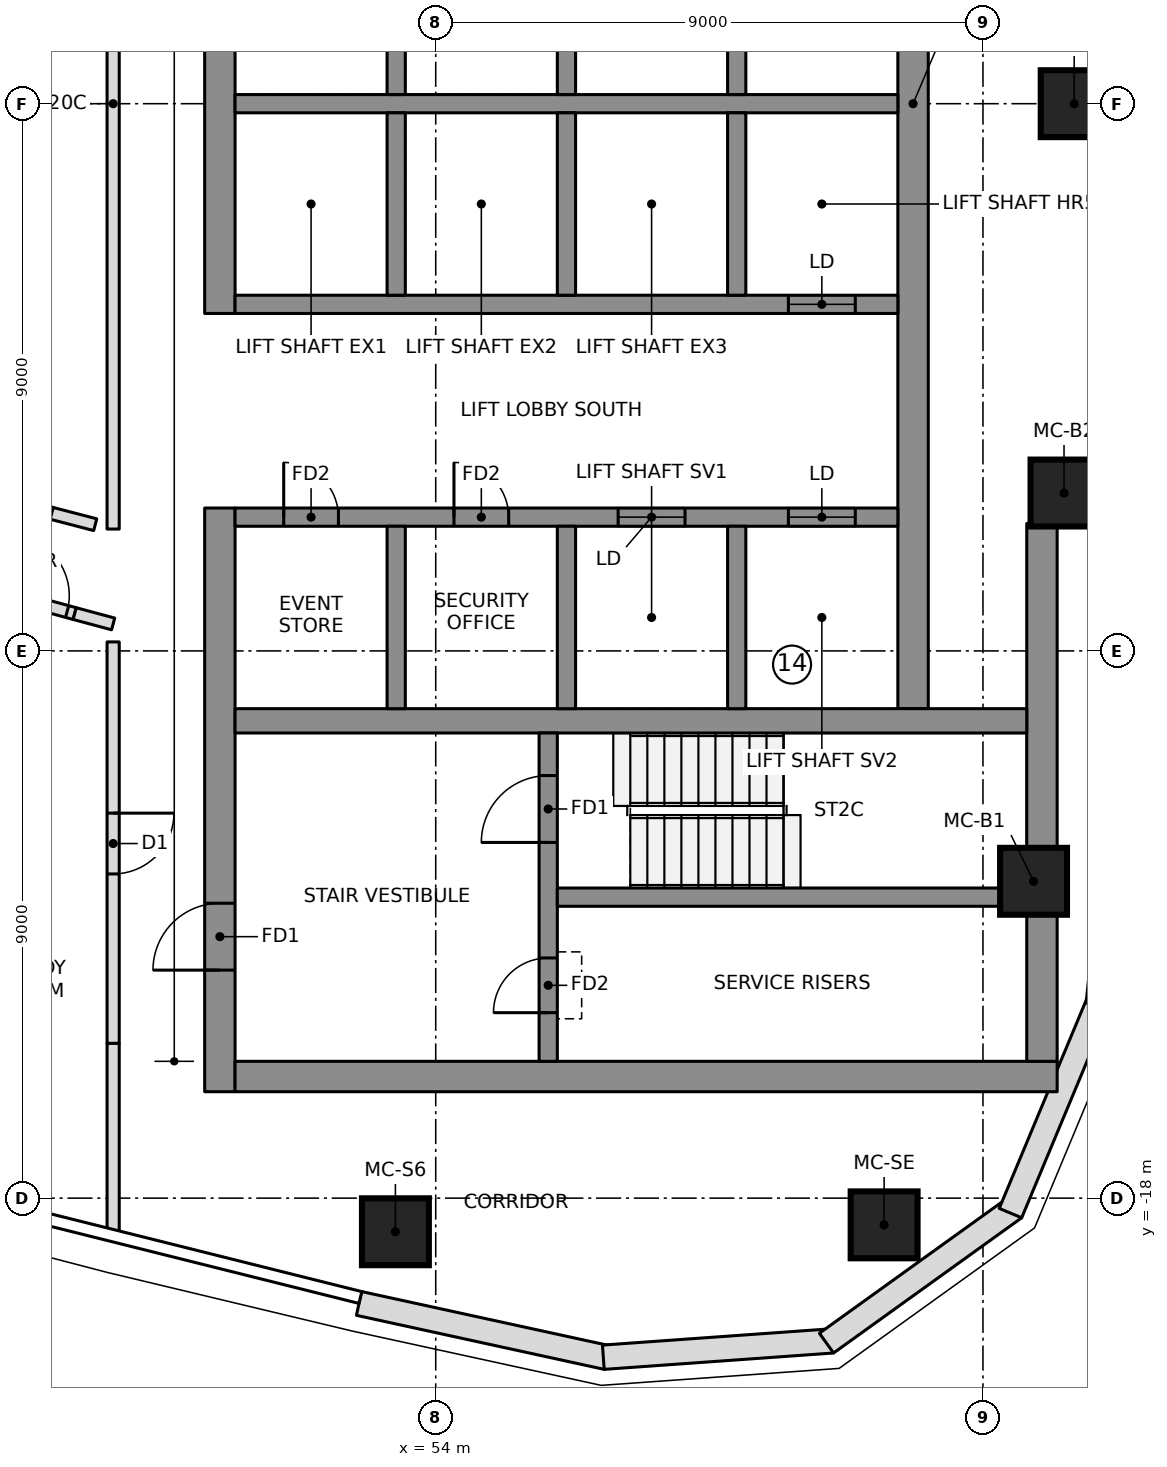
"""IFC4 building model, lengths in metres.
Left out: names, types, materials, properties, quantities, classifications, styles, units other than length and angle.
Written with IfcOpenShell. Run it as: python <this file> out.ifc"""

import sys

from ifc_helpers import new_model, si_unit, direction, frame, frame_2d, origin, origin_2d, place, context, subcontext, project, spatial, polyline, rectangle, outline, extrude, element, fill, save


model = new_model("IFC4")
c1 = context("Model", 3, precision=1e-05, world=origin(), true_north=direction((0.0, 1.0)))
c2 = subcontext(c1, "Body", "Model", "MODEL_VIEW")
j1 = project(units=[si_unit("LENGTHUNIT", "METRE"), si_unit("PLANEANGLEUNIT", "RADIAN")], contexts=[c1])
p1 = place(None, origin())
s1 = spatial("IfcSite", under=j1, at=p1, CompositionType="ELEMENT")
p2 = place(p1, origin())
s2 = spatial("IfcBuilding", under=s1, at=p2, CompositionType="ELEMENT")
p3 = place(p2, frame((0.0, 0.0, 267.9)))
s3 = spatial("IfcBuildingStorey", under=s2, at=p3, CompositionType="ELEMENT", Elevation=267.9)
p4 = place(p3, frame((50.45, -3.45, 0.0), z_axis=(0.0, 0.0, 1.0), x_axis=(0.0, 1.0, 0.0)))
e1 = element("IfcWall", 1, at=p4, inside=s3, PredefinedType="SHEAR", context=c2, shape_type="SweptSolid", body=[
    extrude(rectangle(XDim=6.9, YDim=0.5, at=frame_2d((3.45, 0.0))), origin(), (0.0, 0.0, 1.0), 3.55),
])
p5 = place(p3, frame((50.45, -16.25, 0.0), z_axis=(0.0, 0.0, 1.0), x_axis=(0.0, 1.0, 0.0)))
e2 = element("IfcWall", 2, at=p5, inside=s3, PredefinedType="SHEAR", context=c2, shape_type="SweptSolid", body=[
    extrude(rectangle(XDim=9.6, YDim=0.5, at=frame_2d((4.8, 0.0))), origin(), (0.0, 0.0, 1.0), 3.55),
])
p6 = place(p5, frame((2.0, 0.0, 0.0)))
e3 = element("IfcOpeningElement", 3, at=p6, cuts=e2, PredefinedType="OPENING", context=c2, shape_type="SweptSolid", body=[
    extrude(rectangle(XDim=1.1, YDim=2.1, at=frame_2d((0.55, 1.05))), frame((0.0, 0.26, 0.0), z_axis=(0.0, -1.0, 0.0), x_axis=(1.0, 0.0, 0.0)), (0.0, 0.0, 1.0), 0.52),
])
p7 = place(p3, frame((50.7, -16.0, 0.0), z_axis=(0.0, 0.0, 1.0), x_axis=(1.0, 0.0, 0.0)))
e4 = element("IfcWall", 4, at=p7, inside=s3, PredefinedType="SHEAR", context=c2, shape_type="SweptSolid", body=[
    extrude(rectangle(XDim=13.52, YDim=0.5, at=frame_2d((6.76, 0.0))), origin(), (0.0, 0.0, 1.0), 3.55),
])
p8 = place(p3, frame((63.97, -15.75, 0.0), z_axis=(0.0, 0.0, 1.0), x_axis=(0.0, 1.0, 0.0)))
e5 = element("IfcWall", 5, at=p8, inside=s3, PredefinedType="SHEAR", context=c2, shape_type="SweptSolid", body=[
    extrude(rectangle(XDim=8.847, YDim=0.5, at=frame_2d((4.423, 0.0))), origin(), (0.0, 0.0, 1.0), 3.55),
])
p9 = place(p3, frame((61.85, -9.95, 0.0), z_axis=(0.0, 0.0, 1.0), x_axis=(0.0, 1.0, 0.0)))
e6 = element("IfcWall", 6, at=p9, inside=s3, PredefinedType="SHEAR", context=c2, shape_type="SweptSolid", body=[
    extrude(rectangle(XDim=19.9, YDim=0.5, at=frame_2d((9.95, 0.0))), origin(), (0.0, 0.0, 1.0), 3.55),
])
p10 = place(p3, frame((50.7, -10.15, 0.0), z_axis=(0.0, 0.0, 1.0), x_axis=(1.0, 0.0, 0.0)))
e7 = element("IfcWall", 7, at=p10, inside=s3, PredefinedType="SHEAR", context=c2, shape_type="SweptSolid", body=[
    extrude(rectangle(XDim=13.02, YDim=0.4, at=frame_2d((6.51, 0.0))), origin(), (0.0, 0.0, 1.0), 3.55),
])
p11 = place(p3, frame((50.7, 0.0, 0.0), z_axis=(0.0, 0.0, 1.0), x_axis=(1.0, 0.0, 0.0)))
e8 = element("IfcWall", 8, at=p11, inside=s3, PredefinedType="SHEAR", context=c2, shape_type="SweptSolid", body=[
    extrude(rectangle(XDim=10.9, YDim=0.3, at=frame_2d((5.45, 0.0))), origin(), (0.0, 0.0, 1.0), 3.55),
])
for number, where, z_axis, x_axis in (
    (9, (53.35, 0.15, 0.0), (0.0, 0.0, 1.0), (0.0, 1.0, 0.0)),
    (10, (56.15, 0.15, 0.0), (0.0, 0.0, 1.0), (0.0, 1.0, 0.0)),
    (11, (58.95, 0.15, 0.0), (0.0, 0.0, 1.0), (0.0, 1.0, 0.0)),
):
    element("IfcWall", number, at=place(p3, frame(where, z_axis=z_axis, x_axis=x_axis)), inside=s3, PredefinedType="SHEAR", context=c2, shape_type="SweptSolid", body=[
        extrude(rectangle(XDim=3.0, YDim=0.3, at=frame_2d((1.5, 0.0))), origin(), (0.0, 0.0, 1.0), 3.55),
    ])
p12 = place(p3, frame((50.7, -3.3, 0.0), z_axis=(0.0, 0.0, 1.0), x_axis=(1.0, 0.0, 0.0)))
e12 = element("IfcWall", 12, at=p12, inside=s3, PredefinedType="SHEAR", context=c2, shape_type="SweptSolid", body=[
    extrude(rectangle(XDim=10.9, YDim=0.3, at=frame_2d((5.45, 0.0))), origin(), (0.0, 0.0, 1.0), 3.55),
])
p13 = place(p12, frame((9.1, 0.0, 0.0)))
e13 = element("IfcOpeningElement", 13, at=p13, cuts=e12, PredefinedType="OPENING", context=c2, shape_type="SweptSolid", body=[
    extrude(rectangle(XDim=1.1, YDim=2.1, at=frame_2d((0.55, 1.05))), frame((0.0, 0.16, 0.0), z_axis=(0.0, -1.0, 0.0), x_axis=(1.0, 0.0, 0.0)), (0.0, 0.0, 1.0), 0.32),
])
p14 = place(p3, frame((50.7, -6.8, 0.0), z_axis=(0.0, 0.0, 1.0), x_axis=(1.0, 0.0, 0.0)))
e14 = element("IfcWall", 14, at=p14, inside=s3, PredefinedType="SHEAR", context=c2, shape_type="SweptSolid", body=[
    extrude(rectangle(XDim=10.9, YDim=0.3, at=frame_2d((5.45, 0.0))), origin(), (0.0, 0.0, 1.0), 3.55),
])
p15 = place(p14, frame((6.3, 0.0, 0.0)))
e15 = element("IfcOpeningElement", 15, at=p15, cuts=e14, PredefinedType="OPENING", context=c2, shape_type="SweptSolid", body=[
    extrude(rectangle(XDim=1.1, YDim=2.1, at=frame_2d((0.55, 1.05))), frame((0.0, 0.16, 0.0), z_axis=(0.0, -1.0, 0.0), x_axis=(1.0, 0.0, 0.0)), (0.0, 0.0, 1.0), 0.32),
])
p16 = place(p14, frame((9.1, 0.0, 0.0)))
e16 = element("IfcOpeningElement", 16, at=p16, cuts=e14, PredefinedType="OPENING", context=c2, shape_type="SweptSolid", body=[
    extrude(rectangle(XDim=1.1, YDim=2.1, at=frame_2d((0.55, 1.05))), frame((0.0, 0.16, 0.0), z_axis=(0.0, -1.0, 0.0), x_axis=(1.0, 0.0, 0.0)), (0.0, 0.0, 1.0), 0.32),
])
p17 = place(p14, frame((0.8, 0.0, 0.0)))
e17 = element("IfcOpeningElement", 17, at=p17, cuts=e14, PredefinedType="OPENING", context=c2, shape_type="SweptSolid", body=[
    extrude(rectangle(XDim=0.9, YDim=2.1, at=frame_2d((0.45, 1.05))), frame((0.0, 0.16, 0.0), z_axis=(0.0, -1.0, 0.0), x_axis=(1.0, 0.0, 0.0)), (0.0, 0.0, 1.0), 0.32),
])
p18 = place(p14, frame((3.6, 0.0, 0.0)))
e18 = element("IfcOpeningElement", 18, at=p18, cuts=e14, PredefinedType="OPENING", context=c2, shape_type="SweptSolid", body=[
    extrude(rectangle(XDim=0.9, YDim=2.1, at=frame_2d((0.45, 1.05))), frame((0.0, 0.16, 0.0), z_axis=(0.0, -1.0, 0.0), x_axis=(1.0, 0.0, 0.0)), (0.0, 0.0, 1.0), 0.32),
])
for number, where, z_axis, x_axis in (
    (19, (53.35, -3.15, 0.0), (0.0, 0.0, 1.0), (0.0, 1.0, 0.0)),
    (20, (53.35, -9.95, 0.0), (0.0, 0.0, 1.0), (0.0, 1.0, 0.0)),
    (21, (56.15, -3.15, 0.0), (0.0, 0.0, 1.0), (0.0, 1.0, 0.0)),
    (22, (56.15, -9.95, 0.0), (0.0, 0.0, 1.0), (0.0, 1.0, 0.0)),
    (23, (58.95, -3.15, 0.0), (0.0, 0.0, 1.0), (0.0, 1.0, 0.0)),
    (24, (58.95, -9.95, 0.0), (0.0, 0.0, 1.0), (0.0, 1.0, 0.0)),
):
    element("IfcWall", number, at=place(p3, frame(where, z_axis=z_axis, x_axis=x_axis)), inside=s3, PredefinedType="SHEAR", context=c2, shape_type="SweptSolid", body=[
        extrude(rectangle(XDim=3.0, YDim=0.3, at=frame_2d((1.5, 0.0))), origin(), (0.0, 0.0, 1.0), 3.55),
    ])
p19 = place(p3, frame((55.85, -15.75, 0.0), z_axis=(0.0, 0.0, 1.0), x_axis=(0.0, 1.0, 0.0)))
e25 = element("IfcWall", 25, at=p19, inside=s3, PredefinedType="SHEAR", context=c2, shape_type="SweptSolid", body=[
    extrude(rectangle(XDim=5.4, YDim=0.3, at=frame_2d((2.7, 0.0))), origin(), (0.0, 0.0, 1.0), 3.55),
])
p20 = place(p19, frame((3.6, 0.0, 0.0)))
e26 = element("IfcOpeningElement", 26, at=p20, cuts=e25, PredefinedType="OPENING", context=c2, shape_type="SweptSolid", body=[
    extrude(rectangle(XDim=1.1, YDim=2.1, at=frame_2d((0.55, 1.05))), frame((0.0, 0.16, 0.0), z_axis=(0.0, -1.0, 0.0), x_axis=(1.0, 0.0, 0.0)), (0.0, 0.0, 1.0), 0.32),
])
p21 = place(p19, frame((0.8, 0.0, 0.0)))
e27 = element("IfcOpeningElement", 27, at=p21, cuts=e25, PredefinedType="OPENING", context=c2, shape_type="SweptSolid", body=[
    extrude(rectangle(XDim=0.9, YDim=2.1, at=frame_2d((0.45, 1.05))), frame((0.0, 0.16, 0.0), z_axis=(0.0, -1.0, 0.0), x_axis=(1.0, 0.0, 0.0)), (0.0, 0.0, 1.0), 0.32),
])
p22 = place(p3, frame((56.0, -13.05, 0.0), z_axis=(0.0, 0.0, 1.0), x_axis=(1.0, 0.0, 0.0)))
e28 = element("IfcWall", 28, at=p22, inside=s3, PredefinedType="SHEAR", context=c2, shape_type="SweptSolid", body=[
    extrude(rectangle(XDim=7.72, YDim=0.3, at=frame_2d((3.86, 0.0))), origin(), (0.0, 0.0, 1.0), 3.55),
])
for number, where, z_axis, x_axis in (
    (29, (53.337, -18.553, 0.0), (0.0, 0.0, 1.0), (1.0, 0.0, 0.0)),
    (30, (61.374, -18.44, 0.0), (0.0, 0.0, 1.0), (1.0, 0.0, 0.0)),
    (31, (63.832, -12.789, 0.0), (0.0, 0.0, 1.0), (1.0, 0.0, 0.0)),
    (32, (64.333, -6.403, 0.0), (0.0, 0.0, 1.0), (1.0, 0.0, 0.0)),
    (33, (64.5, 0.0, 0.0), (0.0, 0.0, 1.0), (1.0, 0.0, 0.0)),
):
    element("IfcColumn", number, at=place(p3, frame(where, z_axis=z_axis, x_axis=x_axis)), inside=s3, PredefinedType="COLUMN", context=c2, shape_type="SweptSolid", body=[
        extrude(rectangle(XDim=1.1, YDim=1.1, at=origin_2d()), origin(), (0.0, 0.0, 1.0), 3.55),
    ])
p23 = place(p3, frame((52.738, -19.732, 0.0), z_axis=(0.0, 0.0, 1.0), x_axis=(0.977020225348, -0.213146614471, 0.0)))
e34 = element("IfcWall", 34, at=p23, inside=s3, PredefinedType="NOTDEFINED", context=c2, shape_type="SweptSolid", body=[
    extrude(outline(polyline([(0.0, -0.2), (4.171, -0.2), (4.113, 0.2), (0.0, 0.2), (0.0, -0.2)])), origin(), (0.0, 0.0, 1.0), 3.25),
])
p24 = place(p3, frame((56.785, -20.615, 0.0), z_axis=(0.0, 0.0, 1.0), x_axis=(0.99746272096, 0.071190731806, 0.0)))
e35 = element("IfcWall", 35, at=p24, inside=s3, PredefinedType="NOTDEFINED", context=c2, shape_type="SweptSolid", body=[
    extrude(outline(polyline([(-0.029, -0.2), (3.753, -0.2), (3.64, 0.2), (0.029, 0.2), (-0.029, -0.2)])), origin(), (0.0, 0.0, 1.0), 3.25),
])
p25 = place(p3, frame((60.472, -20.352, 0.0), z_axis=(0.0, 0.0, 1.0), x_axis=(0.811962548682, 0.583709533533, 0.0)))
e36 = element("IfcWall", 36, at=p25, inside=s3, PredefinedType="NOTDEFINED", context=c2, shape_type="SweptSolid", body=[
    extrude(outline(polyline([(-0.057, -0.2), (3.753, -0.2), (3.64, 0.2), (0.057, 0.2), (-0.057, -0.2)])), origin(), (0.0, 0.0, 1.0), 3.25),
])
p26 = place(p3, frame((63.474, -18.194, 0.0), z_axis=(0.0, 0.0, 1.0), x_axis=(0.385285857918, 0.922797273343, 0.0)))
e37 = element("IfcWall", 37, at=p26, inside=s3, PredefinedType="NOTDEFINED", context=c2, shape_type="SweptSolid", body=[
    extrude(outline(polyline([(-0.057, -0.2), (3.726, -0.2), (3.667, 0.2), (0.057, 0.2), (-0.057, -0.2)])), origin(), (0.0, 0.0, 1.0), 3.25),
])
p27 = place(p3, frame((64.898, -14.782, 0.0), z_axis=(0.0, 0.0, 1.0), x_axis=(0.102249826987, 0.994758751096, 0.0)))
e38 = element("IfcWall", 38, at=p27, inside=s3, PredefinedType="NOTDEFINED", context=c2, shape_type="SweptSolid", body=[
    extrude(outline(polyline([(-0.03, -0.2), (4.237, -0.2), (4.23, 0.2), (0.03, 0.2), (-0.03, -0.2)])), origin(), (0.0, 0.0, 1.0), 3.25),
])
p28 = place(p3, frame((44.031, -7.286, 0.0), z_axis=(0.0, 0.0, 1.0), x_axis=(0.964708521199, -0.263320088726, 0.0)))
e39 = element("IfcWall", 39, at=p28, inside=s3, PredefinedType="PARTITIONING", context=c2, shape_type="SweptSolid", body=[
    extrude(rectangle(XDim=4.179, YDim=0.2, at=frame_2d((2.089, 0.0))), origin(), (0.0, 0.0, 1.0), 3.25),
])
p29 = place(p28, frame((3.05, 0.0, 0.0)))
e40 = element("IfcOpeningElement", 40, at=p29, cuts=e39, PredefinedType="OPENING", context=c2, shape_type="SweptSolid", body=[
    extrude(rectangle(XDim=1.0, YDim=2.1, at=frame_2d((0.5, 1.05))), frame((0.0, 0.11, 0.0), z_axis=(0.0, -1.0, 0.0), x_axis=(1.0, 0.0, 0.0)), (0.0, 0.0, 1.0), 0.22),
])
p30 = place(p3, frame((47.684, -6.738, 0.0), z_axis=(0.0, 0.0, 1.0), x_axis=(-0.962411212211, 0.271596499628, 0.0)))
e41 = element("IfcWall", 41, at=p30, inside=s3, PredefinedType="PARTITIONING", context=c2, shape_type="SweptSolid", body=[
    extrude(rectangle(XDim=3.913, YDim=0.2, at=frame_2d((1.957, 0.0))), origin(), (0.0, 0.0, 1.0), 3.25),
])
p31 = place(p3, frame((48.4, -6.924, 0.0), z_axis=(0.0, 0.0, 1.0), x_axis=(-0.967585713416, 0.252542842294, 0.0)))
e42 = element("IfcWall", 42, at=p31, inside=s3, PredefinedType="PARTITIONING", context=c2, shape_type="SweptSolid", body=[
    extrude(rectangle(XDim=0.74, YDim=0.2, at=frame_2d((0.37, 0.0))), origin(), (0.0, 0.0, 1.0), 3.25),
])
p32 = place(p3, frame((48.695, -8.852, 0.0), z_axis=(0.0, 0.0, 1.0), x_axis=(0.0, -1.0, 0.0)))
e43 = element("IfcWall", 43, at=p32, inside=s3, PredefinedType="PARTITIONING", context=c2, shape_type="SweptSolid", body=[
    extrude(rectangle(XDim=6.603, YDim=0.2, at=frame_2d((3.302, 0.0))), origin(), (0.0, 0.0, 1.0), 3.25),
])
p33 = place(p32, frame((2.816, 0.0, 0.0)))
e44 = element("IfcOpeningElement", 44, at=p33, cuts=e43, PredefinedType="OPENING", context=c2, shape_type="SweptSolid", body=[
    extrude(rectangle(XDim=1.0, YDim=2.1, at=frame_2d((0.5, 1.05))), frame((0.0, 0.11, 0.0), z_axis=(0.0, -1.0, 0.0), x_axis=(1.0, 0.0, 0.0)), (0.0, 0.0, 1.0), 0.22),
])
p34 = place(p3, frame((48.695, 6.996, 0.0), z_axis=(0.0, 0.0, 1.0), x_axis=(0.0, -1.0, 0.0)))
e45 = element("IfcWall", 45, at=p34, inside=s3, PredefinedType="PARTITIONING", context=c2, shape_type="SweptSolid", body=[
    extrude(rectangle(XDim=13.992, YDim=0.2, at=frame_2d((6.996, 0.0))), origin(), (0.0, 0.0, 1.0), 3.25),
])
p35 = place(p3, frame((48.062, -8.386, 0.0), z_axis=(0.0, 0.0, 1.0), x_axis=(0.965669715173, -0.259772980114, 0.0)))
e46 = element("IfcWall", 46, at=p35, inside=s3, PredefinedType="PARTITIONING", context=c2, shape_type="SweptSolid", body=[
    extrude(rectangle(XDim=0.655, YDim=0.2, at=frame_2d((0.328, 0.0))), origin(), (0.0, 0.0, 1.0), 3.25),
])
p36 = place(p3, frame((48.695, -15.455, 0.0), z_axis=(0.0, 0.0, 1.0), x_axis=(0.0, -1.0, 0.0)))
e47 = element("IfcWall", 47, at=p36, inside=s3, PredefinedType="PARTITIONING", context=c2, shape_type="SweptSolid", body=[
    extrude(rectangle(XDim=3.098, YDim=0.2, at=frame_2d((1.549, 0.0))), origin(), (0.0, 0.0, 1.0), 3.25),
])
p37 = place(p29, origin())
e48 = element("IfcDoor", 48, at=p37, inside=s3, OperationType="SINGLE_SWING_RIGHT", PredefinedType="DOOR", context=c2, shape_type="SweptSolid", body=[
    extrude(rectangle(XDim=1.0, YDim=2.1, at=frame_2d((0.5, 1.05))), frame((0.0, 0.025, 0.0), z_axis=(0.0, -1.0, 0.0), x_axis=(1.0, 0.0, 0.0)), (0.0, 0.0, 1.0), 0.05),
])
fill(e40, e48)
p38 = place(p33, origin())
e49 = element("IfcDoor", 49, at=p38, inside=s3, OperationType="SINGLE_SWING_LEFT", PredefinedType="DOOR", context=c2, shape_type="SweptSolid", body=[
    extrude(rectangle(XDim=1.0, YDim=2.1, at=frame_2d((0.5, 1.05))), frame((0.0, 0.025, 0.0), z_axis=(0.0, -1.0, 0.0), x_axis=(1.0, 0.0, 0.0)), (0.0, 0.0, 1.0), 0.05),
])
fill(e44, e49)
p39 = place(p13, origin())
e50 = element("IfcDoor", 50, at=p39, inside=s3, OperationType="DOUBLE_DOOR_SLIDING", PredefinedType="DOOR", context=c2, shape_type="SweptSolid", body=[
    extrude(rectangle(XDim=1.1, YDim=2.1, at=frame_2d((0.55, 1.05))), frame((0.0, 0.025, 0.0), z_axis=(0.0, -1.0, 0.0), x_axis=(1.0, 0.0, 0.0)), (0.0, 0.0, 1.0), 0.05),
])
fill(e13, e50)
p40 = place(p15, origin())
e51 = element("IfcDoor", 51, at=p40, inside=s3, OperationType="DOUBLE_DOOR_SLIDING", PredefinedType="DOOR", context=c2, shape_type="SweptSolid", body=[
    extrude(rectangle(XDim=1.1, YDim=2.1, at=frame_2d((0.55, 1.05))), frame((0.0, 0.025, 0.0), z_axis=(0.0, -1.0, 0.0), x_axis=(1.0, 0.0, 0.0)), (0.0, 0.0, 1.0), 0.05),
])
fill(e15, e51)
p41 = place(p16, origin())
e52 = element("IfcDoor", 52, at=p41, inside=s3, OperationType="DOUBLE_DOOR_SLIDING", PredefinedType="DOOR", context=c2, shape_type="SweptSolid", body=[
    extrude(rectangle(XDim=1.1, YDim=2.1, at=frame_2d((0.55, 1.05))), frame((0.0, 0.025, 0.0), z_axis=(0.0, -1.0, 0.0), x_axis=(1.0, 0.0, 0.0)), (0.0, 0.0, 1.0), 0.05),
])
fill(e16, e52)
p42 = place(p20, origin())
e53 = element("IfcDoor", 53, at=p42, inside=s3, OperationType="SINGLE_SWING_RIGHT", PredefinedType="DOOR", context=c2, shape_type="SweptSolid", body=[
    extrude(rectangle(XDim=1.1, YDim=2.1, at=frame_2d((0.55, 1.05))), frame((0.0, 0.025, 0.0), z_axis=(0.0, -1.0, 0.0), x_axis=(1.0, 0.0, 0.0)), (0.0, 0.0, 1.0), 0.05),
])
fill(e26, e53)
p43 = place(p6, origin())
e54 = element("IfcDoor", 54, at=p43, inside=s3, OperationType="SINGLE_SWING_RIGHT", PredefinedType="DOOR", context=c2, shape_type="SweptSolid", body=[
    extrude(rectangle(XDim=1.1, YDim=2.1, at=frame_2d((0.55, 1.05))), frame((0.0, 0.025, 0.0), z_axis=(0.0, -1.0, 0.0), x_axis=(1.0, 0.0, 0.0)), (0.0, 0.0, 1.0), 0.05),
])
fill(e3, e54)
p44 = place(p21, origin())
e55 = element("IfcDoor", 55, at=p44, inside=s3, OperationType="SINGLE_SWING_LEFT", PredefinedType="DOOR", context=c2, shape_type="SweptSolid", body=[
    extrude(rectangle(XDim=0.9, YDim=2.1, at=frame_2d((0.45, 1.05))), frame((0.0, 0.025, 0.0), z_axis=(0.0, -1.0, 0.0), x_axis=(1.0, 0.0, 0.0)), (0.0, 0.0, 1.0), 0.05),
])
fill(e27, e55)
p45 = place(p17, origin())
e56 = element("IfcDoor", 56, at=p45, inside=s3, OperationType="SINGLE_SWING_LEFT", PredefinedType="DOOR", context=c2, shape_type="SweptSolid", body=[
    extrude(rectangle(XDim=0.9, YDim=2.1, at=frame_2d((0.45, 1.05))), frame((0.0, 0.025, 0.0), z_axis=(0.0, -1.0, 0.0), x_axis=(1.0, 0.0, 0.0)), (0.0, 0.0, 1.0), 0.05),
])
fill(e17, e56)
p46 = place(p18, origin())
e57 = element("IfcDoor", 57, at=p46, inside=s3, OperationType="SINGLE_SWING_LEFT", PredefinedType="DOOR", context=c2, shape_type="SweptSolid", body=[
    extrude(rectangle(XDim=0.9, YDim=2.1, at=frame_2d((0.45, 1.05))), frame((0.0, 0.025, 0.0), z_axis=(0.0, -1.0, 0.0), x_axis=(1.0, 0.0, 0.0)), (0.0, 0.0, 1.0), 0.05),
])
fill(e18, e57)
save(model, sys.argv[1])
